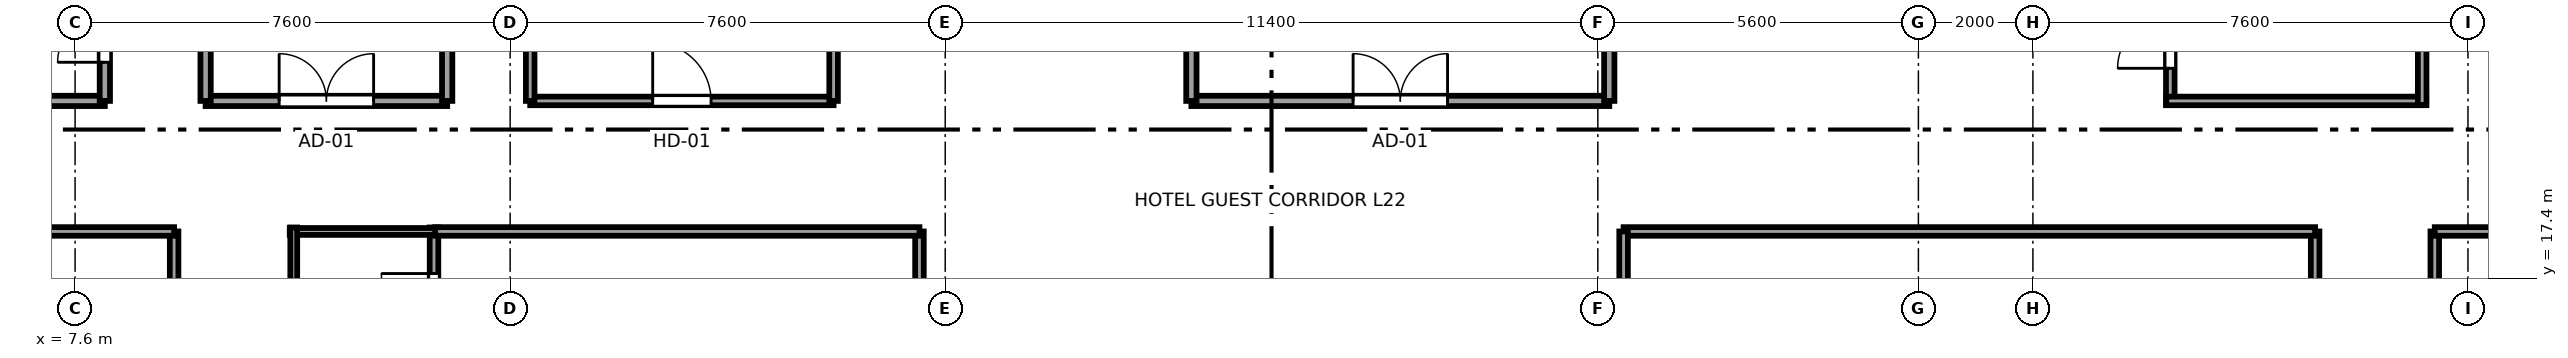
"""IFC4 building model, lengths in metres.
Left out: names, types, materials, properties, quantities, classifications, styles, units other than length and angle.
Written with IfcOpenShell. Run it as: python <this file> out.ifc"""

import sys

from ifc_helpers import new_model, si_unit, direction, frame, frame_2d, origin, place, context, subcontext, project, spatial, rectangle, extrude, source, transform, mapped, element, fill, save


model = new_model("IFC4")
c1 = context("Model", 3, precision=1e-05, world=origin(), true_north=direction((0.0, 1.0)))
c2 = subcontext(c1, "Body", "Model", "MODEL_VIEW")
j1 = project(units=[si_unit("LENGTHUNIT", "METRE"), si_unit("PLANEANGLEUNIT", "RADIAN")], contexts=[c1])
p1 = place(None, origin())
s1 = spatial("IfcSite", under=j1, at=p1, CompositionType="ELEMENT")
p2 = place(p1, origin())
s2 = spatial("IfcBuilding", under=s1, at=p2, CompositionType="ELEMENT")
p3 = place(p2, frame((0.0, 0.0, 88.8)))
s3 = spatial("IfcBuildingStorey", under=s2, at=p3, CompositionType="ELEMENT", Elevation=88.8)
p4 = place(p3, frame((13.87, 15.9, 0.0), z_axis=(0.0, 0.0, 1.0), x_axis=(0.0, 1.0, 0.0)))
e1 = element("IfcWall", 1, at=p4, inside=s3, PredefinedType="PARTITIONING", context=c2, shape_type="SweptSolid", body=[
    extrude(rectangle(XDim=2.39, YDim=0.15, at=frame_2d((1.195, 0.0))), origin(), (0.0, 0.0, 1.0), 3.37),
])
p5 = place(p4, frame((0.665, 0.0, 0.0)))
e2 = element("IfcOpeningElement", 2, at=p5, cuts=e1, PredefinedType="OPENING", context=c2, shape_type="SweptSolid", body=[
    extrude(rectangle(XDim=0.92, YDim=2.01, at=frame_2d((0.46, 1.005))), frame((0.0, 0.085, 0.0), z_axis=(0.0, -1.0, 0.0), x_axis=(1.0, 0.0, 0.0)), (0.0, 0.0, 1.0), 0.17),
])
p6 = place(p3, frame((11.35, 18.22, 0.0), z_axis=(0.0, 0.0, 1.0), x_axis=(1.0, 0.0, 0.0)))
e3 = element("IfcWall", 3, at=p6, inside=s3, PredefinedType="PLUMBINGWALL", context=c2, shape_type="SweptSolid", body=[
    extrude(rectangle(XDim=2.59, YDim=0.12, at=frame_2d((1.295, 0.0))), origin(), (0.0, 0.0, 1.0), 3.37),
])
p7 = place(p3, frame((11.42, 15.9, 0.0), z_axis=(0.0, 0.0, 1.0), x_axis=(0.0, 1.0, 0.0)))
e4 = element("IfcWall", 4, at=p7, inside=s3, PredefinedType="PLUMBINGWALL", context=c2, shape_type="SweptSolid", body=[
    extrude(rectangle(XDim=2.39, YDim=0.12, at=frame_2d((1.195, 0.0))), origin(), (0.0, 0.0, 1.0), 2.954),
])
p8 = place(p3, frame((9.33, 11.81, 0.0), z_axis=(0.0, 0.0, 1.0), x_axis=(0.0, 1.0, 0.0)))
e5 = element("IfcWall", 5, at=p8, inside=s3, PredefinedType="PARTITIONING", context=c2, shape_type="SweptSolid", body=[
    extrude(rectangle(XDim=6.41, YDim=0.15, at=frame_2d((3.205, 0.0))), origin(), (0.0, 0.0, 1.0), 3.37),
])
p9 = place(p8, frame((2.695, 0.0, 0.0)))
e6 = element("IfcOpeningElement", 6, at=p9, cuts=e5, PredefinedType="OPENING", context=c2, shape_type="SweptSolid", body=[
    extrude(rectangle(XDim=0.98, YDim=2.12, at=frame_2d((0.49, 1.06))), frame((0.0, 0.085, 0.0), z_axis=(0.0, -1.0, 0.0), x_axis=(1.0, 0.0, 0.0)), (0.0, 0.0, 1.0), 0.17),
])
p10 = place(p3, frame((0.405, 18.22, 0.0), z_axis=(0.0, 0.0, 1.0), x_axis=(1.0, 0.0, 0.0)))
e7 = element("IfcWall", 7, at=p10, inside=s3, PredefinedType="PARTITIONING", context=c2, shape_type="SweptSolid", body=[
    extrude(rectangle(XDim=8.925, YDim=0.15, at=frame_2d((4.462, 0.0))), origin(), (0.0, 0.0, 1.0), 3.37),
])
p11 = place(p3, frame((22.35, 0.405, 0.0), z_axis=(0.0, 0.0, 1.0), x_axis=(0.0, 1.0, 0.0)))
e8 = element("IfcWall", 8, at=p11, inside=s3, PredefinedType="PARTITIONING", context=c2, shape_type="SweptSolid", body=[
    extrude(rectangle(XDim=17.815, YDim=0.15, at=frame_2d((8.907, 0.0))), origin(), (0.0, 0.0, 1.0), 3.37),
])
p12 = place(p3, frame((13.89, 18.22, 0.0), z_axis=(0.0, 0.0, 1.0), x_axis=(1.0, 0.0, 0.0)))
e9 = element("IfcWall", 9, at=p12, inside=s3, PredefinedType="PARTITIONING", context=c2, shape_type="SweptSolid", body=[
    extrude(rectangle(XDim=8.46, YDim=0.15, at=frame_2d((4.23, 0.0))), origin(), (0.0, 0.0, 1.0), 3.37),
])
p13 = place(p3, frame((46.73, 11.76, 0.0), z_axis=(0.0, 0.0, 1.0), x_axis=(0.0, 1.0, 0.0)))
e10 = element("IfcWall", 10, at=p13, inside=s3, PredefinedType="PARTITIONING", context=c2, shape_type="SweptSolid", body=[
    extrude(rectangle(XDim=6.46, YDim=0.15, at=frame_2d((3.23, 0.0))), origin(), (0.0, 0.0, 1.0), 3.37),
])
p14 = place(p13, frame((2.72, 0.0, 0.0)))
e11 = element("IfcOpeningElement", 11, at=p14, cuts=e10, PredefinedType="OPENING", context=c2, shape_type="SweptSolid", body=[
    extrude(rectangle(XDim=0.98, YDim=2.12, at=frame_2d((0.49, 1.06))), frame((0.0, 0.085, 0.0), z_axis=(0.0, -1.0, 0.0), x_axis=(1.0, 0.0, 0.0)), (0.0, 0.0, 1.0), 0.17),
])
p15 = place(p3, frame((34.65, 18.22, 0.0), z_axis=(0.0, 0.0, 1.0), x_axis=(1.0, 0.0, 0.0)))
e12 = element("IfcWall", 12, at=p15, inside=s3, PredefinedType="PARTITIONING", context=c2, shape_type="SweptSolid", body=[
    extrude(rectangle(XDim=12.08, YDim=0.15, at=frame_2d((6.04, 0.0))), origin(), (0.0, 0.0, 1.0), 3.37),
])
p16 = place(p3, frame((34.65, 9.43, 0.0), z_axis=(0.0, 0.0, 1.0), x_axis=(0.0, 1.0, 0.0)))
e13 = element("IfcWall", 13, at=p16, inside=s3, PredefinedType="PARTITIONING", context=c2, shape_type="SweptSolid", body=[
    extrude(rectangle(XDim=8.79, YDim=0.15, at=frame_2d((4.395, 0.0))), origin(), (0.0, 0.0, 1.0), 3.37),
])
p17 = place(p3, frame((48.82, 11.81, 0.0), z_axis=(0.0, 0.0, 1.0), x_axis=(0.0, 1.0, 0.0)))
e14 = element("IfcWall", 14, at=p17, inside=s3, PredefinedType="PARTITIONING", context=c2, shape_type="SweptSolid", body=[
    extrude(rectangle(XDim=6.41, YDim=0.15, at=frame_2d((3.205, 0.0))), origin(), (0.0, 0.0, 1.0), 3.37),
])
p18 = place(p17, frame((1.745, 0.0, 0.0)))
e15 = element("IfcOpeningElement", 15, at=p18, cuts=e14, PredefinedType="OPENING", context=c2, shape_type="SweptSolid", body=[
    extrude(rectangle(XDim=0.98, YDim=2.12, at=frame_2d((0.49, 1.06))), frame((0.0, 0.085, 0.0), z_axis=(0.0, -1.0, 0.0), x_axis=(1.0, 0.0, 0.0)), (0.0, 0.0, 1.0), 0.17),
])
p19 = place(p3, frame((48.82, 18.22, 0.0), z_axis=(0.0, 0.0, 1.0), x_axis=(1.0, 0.0, 0.0)))
e16 = element("IfcWall", 16, at=p19, inside=s3, PredefinedType="PARTITIONING", context=c2, shape_type="SweptSolid", body=[
    extrude(rectangle(XDim=7.775, YDim=0.15, at=frame_2d((3.887, 0.0))), origin(), (0.0, 0.0, 1.0), 3.37),
])
p20 = place(p3, frame((0.405, 20.5, 0.0), z_axis=(0.0, 0.0, 1.0), x_axis=(1.0, 0.0, 0.0)))
e17 = element("IfcWall", 17, at=p20, inside=s3, PredefinedType="PARTITIONING", context=c2, shape_type="SweptSolid", body=[
    extrude(rectangle(XDim=7.715, YDim=0.18, at=frame_2d((3.857, 0.0))), origin(), (0.0, 0.0, 1.0), 3.37),
])
p21 = place(p3, frame((8.12, 20.5, 0.0), z_axis=(0.0, 0.0, 1.0), x_axis=(0.0, 1.0, 0.0)))
e18 = element("IfcWall", 18, at=p21, inside=s3, PredefinedType="PARTITIONING", context=c2, shape_type="SweptSolid", body=[
    extrude(rectangle(XDim=3.6, YDim=0.18, at=frame_2d((1.8, 0.0))), origin(), (0.0, 0.0, 1.0), 3.37),
])
p22 = place(p21, frame((0.675, 0.0, 0.0)))
e19 = element("IfcOpeningElement", 19, at=p22, cuts=e18, PredefinedType="OPENING", context=c2, shape_type="SweptSolid", body=[
    extrude(rectangle(XDim=1.65, YDim=2.15, at=frame_2d((0.825, 1.075))), frame((0.0, 0.1, 0.0), z_axis=(0.0, -1.0, 0.0), x_axis=(1.0, 0.0, 0.0)), (0.0, 0.0, 1.0), 0.2),
])
p23 = place(p3, frame((44.2, 20.43, 0.0), z_axis=(0.0, 0.0, 1.0), x_axis=(0.0, 1.0, 0.0)))
e20 = element("IfcWall", 20, at=p23, inside=s3, PredefinedType="PARTITIONING", context=c2, shape_type="SweptSolid", body=[
    extrude(rectangle(XDim=2.54, YDim=0.15, at=frame_2d((1.27, 0.0))), origin(), (0.0, 0.0, 1.0), 3.37),
])
p24 = place(p23, frame((0.64, 0.0, 0.0)))
e21 = element("IfcOpeningElement", 21, at=p24, cuts=e20, PredefinedType="OPENING", context=c2, shape_type="SweptSolid", body=[
    extrude(rectangle(XDim=0.92, YDim=2.01, at=frame_2d((0.46, 1.005))), frame((0.0, 0.085, 0.0), z_axis=(0.0, -1.0, 0.0), x_axis=(1.0, 0.0, 0.0)), (0.0, 0.0, 1.0), 0.17),
])
p25 = place(p3, frame((44.13, 20.5, 0.0), z_axis=(0.0, 0.0, 1.0), x_axis=(1.0, 0.0, 0.0)))
e22 = element("IfcWall", 22, at=p25, inside=s3, PredefinedType="PARTITIONING", context=c2, shape_type="SweptSolid", body=[
    extrude(rectangle(XDim=4.54, YDim=0.15, at=frame_2d((2.27, 0.0))), origin(), (0.0, 0.0, 1.0), 3.37),
])
p26 = place(p3, frame((48.6, 20.43, 0.0), z_axis=(0.0, 0.0, 1.0), x_axis=(0.0, 1.0, 0.0)))
e23 = element("IfcWall", 23, at=p26, inside=s3, PredefinedType="PARTITIONING", context=c2, shape_type="SweptSolid", body=[
    extrude(rectangle(XDim=2.54, YDim=0.15, at=frame_2d((1.27, 0.0))), origin(), (0.0, 0.0, 1.0), 3.37),
])
p27 = place(p3, frame((9.88, 20.5, 0.0), z_axis=(0.0, 0.0, 1.0), x_axis=(1.0, 0.0, 0.0)))
e24 = element("IfcWall", 24, at=p27, inside=s3, PredefinedType="PARTITIONING", context=c2, shape_type="SweptSolid", body=[
    extrude(rectangle(XDim=4.22, YDim=0.18, at=frame_2d((2.11, 0.0))), origin(), (0.0, 0.0, 1.0), 3.37),
])
p28 = place(p27, frame((1.285, 0.0, 0.0)))
e25 = element("IfcOpeningElement", 25, at=p28, cuts=e24, PredefinedType="OPENING", context=c2, shape_type="SweptSolid", body=[
    extrude(rectangle(XDim=1.65, YDim=2.15, at=frame_2d((0.825, 1.075))), frame((0.0, 0.1, 0.0), z_axis=(0.0, -1.0, 0.0), x_axis=(1.0, 0.0, 0.0)), (0.0, 0.0, 1.0), 0.2),
])
for number, where, z_axis, x_axis in (
    (26, (9.88, 20.5, 0.0), (0.0, 0.0, 1.0), (0.0, 1.0, 0.0)),
    (27, (14.1, 20.5, 0.0), (0.0, 0.0, 1.0), (0.0, 1.0, 0.0)),
):
    element("IfcWall", number, at=place(p3, frame(where, z_axis=z_axis, x_axis=x_axis)), inside=s3, PredefinedType="PARTITIONING", context=c2, shape_type="SweptSolid", body=[
        extrude(rectangle(XDim=9.25, YDim=0.18, at=frame_2d((4.625, 0.0))), origin(), (0.0, 0.0, 1.0), 3.37),
    ])
p29 = place(p3, frame((27.1, 20.5, 0.0), z_axis=(0.0, 0.0, 1.0), x_axis=(1.0, 0.0, 0.0)))
e28 = element("IfcWall", 28, at=p29, inside=s3, PredefinedType="PARTITIONING", context=c2, shape_type="SweptSolid", body=[
    extrude(rectangle(XDim=7.3, YDim=0.18, at=frame_2d((3.65, 0.0))), origin(), (0.0, 0.0, 1.0), 3.37),
])
p30 = place(p29, frame((2.825, 0.0, 0.0)))
e29 = element("IfcOpeningElement", 29, at=p30, cuts=e28, PredefinedType="OPENING", context=c2, shape_type="SweptSolid", body=[
    extrude(rectangle(XDim=1.65, YDim=2.15, at=frame_2d((0.825, 1.075))), frame((0.0, 0.1, 0.0), z_axis=(0.0, -1.0, 0.0), x_axis=(1.0, 0.0, 0.0)), (0.0, 0.0, 1.0), 0.2),
])
for number, where, z_axis, x_axis in (
    (30, (27.1, 20.5, 0.0), (0.0, 0.0, 1.0), (0.0, 1.0, 0.0)),
    (31, (34.4, 20.5, 0.0), (0.0, 0.0, 1.0), (0.0, 1.0, 0.0)),
):
    element("IfcWall", number, at=place(p3, frame(where, z_axis=z_axis, x_axis=x_axis)), inside=s3, PredefinedType="PARTITIONING", context=c2, shape_type="SweptSolid", body=[
        extrude(rectangle(XDim=9.3, YDim=0.18, at=frame_2d((4.65, 0.0))), origin(), (0.0, 0.0, 1.0), 3.37),
    ])
p31 = place(p3, frame((15.55, 20.5, 0.0), z_axis=(0.0, 0.0, 1.0), x_axis=(1.0, 0.0, 0.0)))
e32 = element("IfcWall", 32, at=p31, inside=s3, PredefinedType="PARTITIONING", context=c2, shape_type="SweptSolid", body=[
    extrude(rectangle(XDim=5.3, YDim=0.15, at=frame_2d((2.65, 0.0))), origin(), (0.0, 0.0, 1.0), 3.37),
])
p32 = place(p31, frame((2.14, 0.0, 0.0)))
e33 = element("IfcOpeningElement", 33, at=p32, cuts=e32, PredefinedType="OPENING", context=c2, shape_type="SweptSolid", body=[
    extrude(rectangle(XDim=1.02, YDim=2.03, at=frame_2d((0.51, 1.015))), frame((0.0, 0.085, 0.0), z_axis=(0.0, -1.0, 0.0), x_axis=(1.0, 0.0, 0.0)), (0.0, 0.0, 1.0), 0.17),
])
for number, where, z_axis, x_axis in (
    (34, (15.55, 20.5, 0.0), (0.0, 0.0, 1.0), (0.0, 1.0, 0.0)),
    (35, (20.85, 20.5, 0.0), (0.0, 0.0, 1.0), (0.0, 1.0, 0.0)),
):
    element("IfcWall", number, at=place(p3, frame(where, z_axis=z_axis, x_axis=x_axis)), inside=s3, PredefinedType="PARTITIONING", context=c2, shape_type="SweptSolid", body=[
        extrude(rectangle(XDim=9.3, YDim=0.15, at=frame_2d((4.65, 0.0))), origin(), (0.0, 0.0, 1.0), 3.37),
    ])
m1 = source(origin(), c2, "Body", "SweptSolid", [
    extrude(rectangle(XDim=0.92, YDim=2.01, at=frame_2d((0.46, 1.005))), frame((0.0, 0.025, 0.0), z_axis=(0.0, -1.0, 0.0), x_axis=(1.0, 0.0, 0.0)), (0.0, 0.0, 1.0), 0.05),
])
p33 = place(p5, origin())
e36 = element("IfcDoor", 36, at=p33, inside=s3, OperationType="SINGLE_SWING_RIGHT", PredefinedType="DOOR", context=c2, shape_type="MappedRepresentation", body=[
    mapped(m1, transform((0.0, 0.0, 0.0), x_axis=(1.0, 0.0, 0.0), y_axis=(0.0, 1.0, 0.0), z_axis=(0.0, 0.0, 1.0), scale=1.0)),
])
fill(e2, e36)
m2 = source(origin(), c2, "Body", "SweptSolid", [
    extrude(rectangle(XDim=1.65, YDim=2.15, at=frame_2d((0.825, 1.075))), frame((0.0, 0.025, 0.0), z_axis=(0.0, -1.0, 0.0), x_axis=(1.0, 0.0, 0.0)), (0.0, 0.0, 1.0), 0.05),
])
p34 = place(p22, origin())
e37 = element("IfcDoor", 37, at=p34, inside=s3, OperationType="DOUBLE_DOOR_SINGLE_SWING", PredefinedType="DOOR", context=c2, shape_type="MappedRepresentation", body=[
    mapped(m2, transform((0.0, 0.0, 0.0), x_axis=(1.0, 0.0, 0.0), y_axis=(0.0, 1.0, 0.0), z_axis=(0.0, 0.0, 1.0), scale=1.0)),
])
fill(e19, e37)
p35 = place(p24, origin())
e38 = element("IfcDoor", 38, at=p35, inside=s3, OperationType="SINGLE_SWING_LEFT", PredefinedType="DOOR", context=c2, shape_type="MappedRepresentation", body=[
    mapped(m1, transform((0.0, 0.0, 0.0), x_axis=(1.0, 0.0, 0.0), y_axis=(0.0, 1.0, 0.0), z_axis=(0.0, 0.0, 1.0), scale=1.0)),
])
fill(e21, e38)
p36 = place(p28, origin())
e39 = element("IfcDoor", 39, at=p36, inside=s3, OperationType="DOUBLE_DOOR_SINGLE_SWING", PredefinedType="DOOR", context=c2, shape_type="MappedRepresentation", body=[
    mapped(m2, transform((0.0, 0.0, 0.0), x_axis=(1.0, 0.0, 0.0), y_axis=(0.0, 1.0, 0.0), z_axis=(0.0, 0.0, 1.0), scale=1.0)),
])
fill(e25, e39)
p37 = place(p30, origin())
e40 = element("IfcDoor", 40, at=p37, inside=s3, OperationType="DOUBLE_DOOR_SINGLE_SWING", PredefinedType="DOOR", context=c2, shape_type="MappedRepresentation", body=[
    mapped(m2, transform((0.0, 0.0, 0.0), x_axis=(1.0, 0.0, 0.0), y_axis=(0.0, 1.0, 0.0), z_axis=(0.0, 0.0, 1.0), scale=1.0)),
])
fill(e29, e40)
m3 = source(origin(), c2, "Body", "SweptSolid", [
    extrude(rectangle(XDim=1.02, YDim=2.03, at=frame_2d((0.51, 1.015))), frame((0.0, 0.025, 0.0), z_axis=(0.0, -1.0, 0.0), x_axis=(1.0, 0.0, 0.0)), (0.0, 0.0, 1.0), 0.05),
])
p38 = place(p32, origin())
e41 = element("IfcDoor", 41, at=p38, inside=s3, OperationType="SINGLE_SWING_LEFT", PredefinedType="DOOR", context=c2, shape_type="MappedRepresentation", body=[
    mapped(m3, transform((0.0, 0.0, 0.0), x_axis=(1.0, 0.0, 0.0), y_axis=(0.0, 1.0, 0.0), z_axis=(0.0, 0.0, 1.0), scale=1.0)),
])
fill(e33, e41)
save(model, sys.argv[1])
